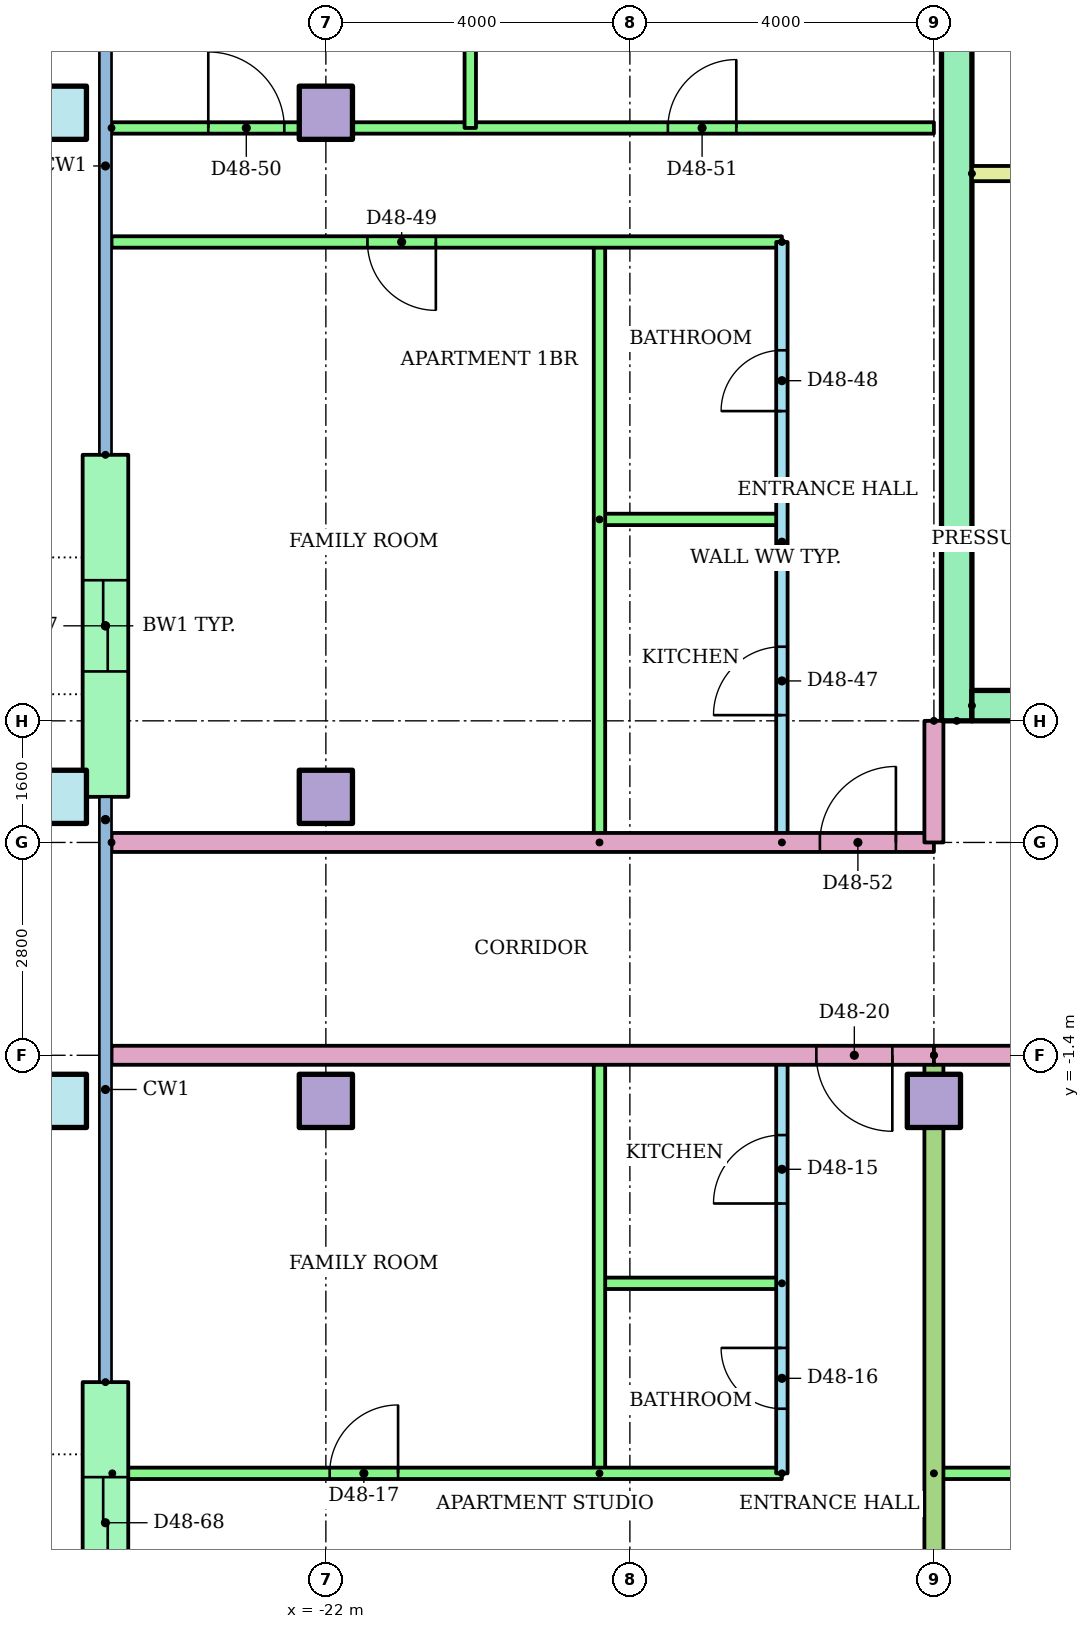
"""IFC4 building model, lengths in metres.
Left out: names, types, materials, properties, quantities, classifications, styles, units other than length and angle.
Written with IfcOpenShell. Run it as: python <this file> out.ifc"""

import sys

from ifc_helpers import new_model, si_unit, direction, frame, frame_2d, origin, origin_2d, place, context, subcontext, project, spatial, rectangle, hollow_rectangle, extrude, element, fill, save


model = new_model("IFC4")
c1 = context("Model", 3, precision=1e-05, world=origin(), true_north=direction((0.0, 1.0)))
c2 = subcontext(c1, "Body", "Model", "MODEL_VIEW")
j1 = project(units=[si_unit("LENGTHUNIT", "METRE"), si_unit("PLANEANGLEUNIT", "RADIAN")], contexts=[c1])
p1 = place(None, origin())
s1 = spatial("IfcSite", under=j1, at=p1, CompositionType="ELEMENT")
p2 = place(p1, origin())
s2 = spatial("IfcBuilding", under=s1, at=p2, CompositionType="ELEMENT")
p3 = place(p2, frame((0.0, 0.0, 184.5)))
s3 = spatial("IfcBuildingStorey", under=s2, at=p3, CompositionType="ELEMENT", Elevation=184.5)
p4 = place(p3, frame((-25.5, -2.0, 0.0)))
e1 = element("IfcColumn", 1, at=p4, inside=s3, PredefinedType="COLUMN", context=c2, shape_type="SweptSolid", body=[
    extrude(hollow_rectangle(XDim=0.7, YDim=0.7, WallThickness=0.036, at=origin_2d()), origin(), (0.0, 0.0, 1.0), 3.2),
])
for number, where in (
    (2, (-22.0, -2.0, 0.0)),
    (3, (-14.0, -2.0, 0.0)),
):
    element("IfcColumn", number, at=place(p3, frame(where)), inside=s3, PredefinedType="COLUMN", context=c2, shape_type="SweptSolid", body=[
        extrude(rectangle(XDim=0.7, YDim=0.7, at=origin_2d()), origin(), (0.0, 0.0, 1.0), 3.2),
    ])
p5 = place(p3, frame((-25.5, 2.0, 0.0)))
e4 = element("IfcColumn", 4, at=p5, inside=s3, PredefinedType="COLUMN", context=c2, shape_type="SweptSolid", body=[
    extrude(hollow_rectangle(XDim=0.7, YDim=0.7, WallThickness=0.036, at=origin_2d()), origin(), (0.0, 0.0, 1.0), 3.2),
])
p6 = place(p3, frame((-22.0, 2.0, 0.0)))
e5 = element("IfcColumn", 5, at=p6, inside=s3, PredefinedType="COLUMN", context=c2, shape_type="SweptSolid", body=[
    extrude(rectangle(XDim=0.7, YDim=0.7, at=origin_2d()), origin(), (0.0, 0.0, 1.0), 3.2),
])
p7 = place(p3, frame((-25.5, 11.0, 0.0)))
e6 = element("IfcColumn", 6, at=p7, inside=s3, PredefinedType="COLUMN", context=c2, shape_type="SweptSolid", body=[
    extrude(hollow_rectangle(XDim=0.7, YDim=0.7, WallThickness=0.036, at=origin_2d()), origin(), (0.0, 0.0, 1.0), 3.2),
])
p8 = place(p3, frame((-22.0, 11.0, 0.0)))
e7 = element("IfcColumn", 7, at=p8, inside=s3, PredefinedType="COLUMN", context=c2, shape_type="SweptSolid", body=[
    extrude(rectangle(XDim=0.7, YDim=0.7, at=origin_2d()), origin(), (0.0, 0.0, 1.0), 3.2),
])
p9 = place(p3, frame((-24.9, 6.5, 0.0), z_axis=(0.0, 0.0, 1.0), x_axis=(0.0, -1.0, 0.0)))
e8 = element("IfcWall", 8, at=p9, inside=s3, PredefinedType="STANDARD", context=c2, shape_type="SweptSolid", body=[
    extrude(rectangle(XDim=4.5, YDim=0.6, at=frame_2d((2.25, 0.0))), origin(), (0.0, 0.0, 1.0), 2.92),
])
p10 = place(p9, frame((1.65, 0.0, 0.0)))
e9 = element("IfcOpeningElement", 9, at=p10, cuts=e8, PredefinedType="OPENING", context=c2, shape_type="SweptSolid", body=[
    extrude(rectangle(XDim=1.2, YDim=2.1, at=frame_2d((0.6, 1.05))), frame((0.0, 0.31, 0.0), z_axis=(0.0, -1.0, 0.0), x_axis=(1.0, 0.0, 0.0)), (0.0, 0.0, 1.0), 0.62),
])
p11 = place(p3, frame((-24.9, -5.7, 0.0), z_axis=(0.0, 0.0, 1.0), x_axis=(0.0, -1.0, 0.0)))
e10 = element("IfcWall", 10, at=p11, inside=s3, PredefinedType="STANDARD", context=c2, shape_type="SweptSolid", body=[
    extrude(rectangle(XDim=3.7, YDim=0.6, at=frame_2d((1.85, 0.0))), origin(), (0.0, 0.0, 1.0), 2.92),
])
p12 = place(p11, frame((1.25, 0.0, 0.0)))
e11 = element("IfcOpeningElement", 11, at=p12, cuts=e10, PredefinedType="OPENING", context=c2, shape_type="SweptSolid", body=[
    extrude(rectangle(XDim=1.2, YDim=2.1, at=frame_2d((0.6, 1.05))), frame((0.0, 0.31, 0.0), z_axis=(0.0, -1.0, 0.0), x_axis=(1.0, 0.0, 0.0)), (0.0, 0.0, 1.0), 0.62),
])
p13 = place(p3, frame((-13.7, 3.0, 0.0), z_axis=(0.0, 0.0, 1.0), x_axis=(0.0, 1.0, 0.0)))
e12 = element("IfcWall", 12, at=p13, inside=s3, PredefinedType="SHEAR", context=c2, shape_type="SweptSolid", body=[
    extrude(rectangle(XDim=17.0, YDim=0.4, at=frame_2d((8.5, 0.0))), origin(), (0.0, 0.0, 1.0), 2.92),
])
p14 = place(p3, frame((-13.5, 3.2, 0.0)))
e13 = element("IfcWall", 13, at=p14, inside=s3, PredefinedType="SHEAR", context=c2, shape_type="SweptSolid", body=[
    extrude(rectangle(XDim=27.0, YDim=0.4, at=frame_2d((13.5, 0.0))), origin(), (0.0, 0.0, 1.0), 2.92),
])
p15 = place(p14, frame((22.083, 0.0, 0.0)))
e14 = element("IfcOpeningElement", 14, at=p15, cuts=e13, PredefinedType="OPENING", context=c2, shape_type="SweptSolid", body=[
    extrude(rectangle(XDim=1.1, YDim=2.1, at=frame_2d((0.55, 1.05))), frame((0.0, 0.21, 0.0), z_axis=(0.0, -1.0, 0.0), x_axis=(1.0, 0.0, 0.0)), (0.0, 0.0, 1.0), 0.42),
])
p16 = place(p14, frame((25.128, 0.0, 0.0)))
e15 = element("IfcOpeningElement", 15, at=p16, cuts=e13, PredefinedType="OPENING", context=c2, shape_type="SweptSolid", body=[
    extrude(rectangle(XDim=1.1, YDim=2.1, at=frame_2d((0.55, 1.05))), frame((0.0, 0.21, 0.0), z_axis=(0.0, -1.0, 0.0), x_axis=(1.0, 0.0, 0.0)), (0.0, 0.0, 1.0), 0.42),
])
p17 = place(p14, frame((12.6, 0.0, 0.0)))
e16 = element("IfcOpeningElement", 16, at=p17, cuts=e13, PredefinedType="OPENING", context=c2, shape_type="SweptSolid", body=[
    extrude(rectangle(XDim=1.8, YDim=2.1, at=frame_2d((0.9, 1.05))), frame((0.0, 0.21, 0.0), z_axis=(0.0, -1.0, 0.0), x_axis=(1.0, 0.0, 0.0)), (0.0, 0.0, 1.0), 0.42),
])
p18 = place(p3, frame((-13.5, 10.2, 0.0)))
e17 = element("IfcWall", 17, at=p18, inside=s3, PredefinedType="PARTITIONING", context=c2, shape_type="SweptSolid", body=[
    extrude(rectangle(XDim=3.9, YDim=0.2, at=frame_2d((1.95, 0.0))), origin(), (0.0, 0.0, 1.0), 2.92),
])
p19 = place(p3, frame((-16.0, -6.9, 0.0), z_axis=(0.0, 0.0, 1.0), x_axis=(0.0, 1.0, 0.0)))
e18 = element("IfcWall", 18, at=p19, inside=s3, PredefinedType="PARTITIONING", context=c2, shape_type="SweptSolid", body=[
    extrude(rectangle(XDim=5.5, YDim=0.15, at=frame_2d((2.75, 0.0))), origin(), (0.0, 0.0, 1.0), 2.4),
])
p20 = place(p19, frame((3.55, 0.0, 0.0)))
e19 = element("IfcOpeningElement", 19, at=p20, cuts=e18, PredefinedType="OPENING", context=c2, shape_type="SweptSolid", body=[
    extrude(rectangle(XDim=0.9, YDim=2.1, at=frame_2d((0.45, 1.05))), frame((0.0, 0.085, 0.0), z_axis=(0.0, -1.0, 0.0), x_axis=(1.0, 0.0, 0.0)), (0.0, 0.0, 1.0), 0.17),
])
p21 = place(p19, frame((0.85, 0.0, 0.0)))
e20 = element("IfcOpeningElement", 20, at=p21, cuts=e18, PredefinedType="OPENING", context=c2, shape_type="SweptSolid", body=[
    extrude(rectangle(XDim=0.8, YDim=2.1, at=frame_2d((0.4, 1.05))), frame((0.0, 0.085, 0.0), z_axis=(0.0, -1.0, 0.0), x_axis=(1.0, 0.0, 0.0)), (0.0, 0.0, 1.0), 0.17),
])
p22 = place(p3, frame((-16.0, -4.4, 0.0), z_axis=(0.0, 0.0, 1.0), x_axis=(-1.0, 0.0, 0.0)))
e21 = element("IfcWall", 21, at=p22, inside=s3, PredefinedType="PARTITIONING", context=c2, shape_type="SweptSolid", body=[
    extrude(rectangle(XDim=2.4, YDim=0.15, at=frame_2d((1.2, 0.0))), origin(), (0.0, 0.0, 1.0), 2.4),
])
p23 = place(p3, frame((-18.4, -6.9, 0.0), z_axis=(0.0, 0.0, 1.0), x_axis=(0.0, 1.0, 0.0)))
e22 = element("IfcWall", 22, at=p23, inside=s3, PredefinedType="PARTITIONING", context=c2, shape_type="SweptSolid", body=[
    extrude(rectangle(XDim=5.5, YDim=0.15, at=frame_2d((2.75, 0.0))), origin(), (0.0, 0.0, 1.0), 2.4),
])
p24 = place(p3, frame((-24.81, -6.9, 0.0)))
e23 = element("IfcWall", 23, at=p24, inside=s3, PredefinedType="PARTITIONING", context=c2, shape_type="SweptSolid", body=[
    extrude(rectangle(XDim=8.81, YDim=0.15, at=frame_2d((4.405, 0.0))), origin(), (0.0, 0.0, 1.0), 2.4),
])
p25 = place(p24, frame((2.86, 0.0, 0.0)))
e24 = element("IfcOpeningElement", 24, at=p25, cuts=e23, PredefinedType="OPENING", context=c2, shape_type="SweptSolid", body=[
    extrude(rectangle(XDim=0.9, YDim=2.1, at=frame_2d((0.45, 1.05))), frame((0.0, 0.085, 0.0), z_axis=(0.0, -1.0, 0.0), x_axis=(1.0, 0.0, 0.0)), (0.0, 0.0, 1.0), 0.17),
])
p26 = place(p3, frame((-14.0, -6.9, 0.0)))
e25 = element("IfcWall", 25, at=p26, inside=s3, PredefinedType="PARTITIONING", context=c2, shape_type="SweptSolid", body=[
    extrude(rectangle(XDim=22.0, YDim=0.15, at=frame_2d((11.0, 0.0))), origin(), (0.0, 0.0, 1.0), 2.4),
])
p27 = place(p26, frame((16.65, 0.0, 0.0)))
e26 = element("IfcOpeningElement", 26, at=p27, cuts=e25, PredefinedType="OPENING", context=c2, shape_type="SweptSolid", body=[
    extrude(rectangle(XDim=0.9, YDim=2.1, at=frame_2d((0.45, 1.05))), frame((0.0, 0.085, 0.0), z_axis=(0.0, -1.0, 0.0), x_axis=(1.0, 0.0, 0.0)), (0.0, 0.0, 1.0), 0.17),
])
p28 = place(p26, frame((10.9, 0.0, 0.0)))
e27 = element("IfcOpeningElement", 27, at=p28, cuts=e25, PredefinedType="OPENING", context=c2, shape_type="SweptSolid", body=[
    extrude(rectangle(XDim=0.9, YDim=2.1, at=frame_2d((0.45, 1.05))), frame((0.0, 0.085, 0.0), z_axis=(0.0, -1.0, 0.0), x_axis=(1.0, 0.0, 0.0)), (0.0, 0.0, 1.0), 0.17),
])
p29 = place(p26, frame((3.6, 0.0, 0.0)))
e28 = element("IfcOpeningElement", 28, at=p29, cuts=e25, PredefinedType="OPENING", context=c2, shape_type="SweptSolid", body=[
    extrude(rectangle(XDim=0.9, YDim=2.1, at=frame_2d((0.45, 1.05))), frame((0.0, 0.085, 0.0), z_axis=(0.0, -1.0, 0.0), x_axis=(1.0, 0.0, 0.0)), (0.0, 0.0, 1.0), 0.17),
])
p30 = place(p3, frame((-14.0, -1.4, 0.0), z_axis=(0.0, 0.0, 1.0), x_axis=(0.0, -1.0, 0.0)))
e29 = element("IfcWall", 29, at=p30, inside=s3, PredefinedType="PARTITIONING", context=c2, shape_type="SweptSolid", body=[
    extrude(rectangle(XDim=15.01, YDim=0.25, at=frame_2d((7.505, 0.0))), origin(), (0.0, 0.0, 1.0), 2.4),
])
p31 = place(p3, frame((-14.0, -1.4, 0.0), z_axis=(0.0, 0.0, 1.0), x_axis=(-1.0, 0.0, 0.0)))
e30 = element("IfcWall", 30, at=p31, inside=s3, PredefinedType="PARTITIONING", context=c2, shape_type="SweptSolid", body=[
    extrude(rectangle(XDim=10.82, YDim=0.25, at=frame_2d((5.41, 0.0))), origin(), (0.0, 0.0, 1.0), 2.4),
])
p32 = place(p31, frame((0.547, 0.0, 0.0)))
e31 = element("IfcOpeningElement", 31, at=p32, cuts=e30, PredefinedType="OPENING", context=c2, shape_type="SweptSolid", body=[
    extrude(rectangle(XDim=1.0, YDim=2.1, at=frame_2d((0.5, 1.05))), frame((0.0, 0.135, 0.0), z_axis=(0.0, -1.0, 0.0), x_axis=(1.0, 0.0, 0.0)), (0.0, 0.0, 1.0), 0.27),
])
p33 = place(p3, frame((-16.0, 1.4, 0.0), z_axis=(0.0, 0.0, 1.0), x_axis=(0.0, 1.0, 0.0)))
e32 = element("IfcWall", 32, at=p33, inside=s3, PredefinedType="PARTITIONING", context=c2, shape_type="SweptSolid", body=[
    extrude(rectangle(XDim=7.9, YDim=0.15, at=frame_2d((3.95, 0.0))), origin(), (0.0, 0.0, 1.0), 2.4),
])
p34 = place(p33, frame((1.675, 0.0, 0.0)))
e33 = element("IfcOpeningElement", 33, at=p34, cuts=e32, PredefinedType="OPENING", context=c2, shape_type="SweptSolid", body=[
    extrude(rectangle(XDim=0.9, YDim=2.1, at=frame_2d((0.45, 1.05))), frame((0.0, 0.085, 0.0), z_axis=(0.0, -1.0, 0.0), x_axis=(1.0, 0.0, 0.0)), (0.0, 0.0, 1.0), 0.17),
])
p35 = place(p33, frame((5.675, 0.0, 0.0)))
e34 = element("IfcOpeningElement", 34, at=p35, cuts=e32, PredefinedType="OPENING", context=c2, shape_type="SweptSolid", body=[
    extrude(rectangle(XDim=0.8, YDim=2.1, at=frame_2d((0.4, 1.05))), frame((0.0, 0.085, 0.0), z_axis=(0.0, -1.0, 0.0), x_axis=(1.0, 0.0, 0.0)), (0.0, 0.0, 1.0), 0.17),
])
p36 = place(p3, frame((-18.4, 5.65, 0.0)))
e35 = element("IfcWall", 35, at=p36, inside=s3, PredefinedType="PARTITIONING", context=c2, shape_type="SweptSolid", body=[
    extrude(rectangle(XDim=2.4, YDim=0.15, at=frame_2d((1.2, 0.0))), origin(), (0.0, 0.0, 1.0), 2.4),
])
p37 = place(p3, frame((-18.4, 1.4, 0.0), z_axis=(0.0, 0.0, 1.0), x_axis=(0.0, 1.0, 0.0)))
e36 = element("IfcWall", 36, at=p37, inside=s3, PredefinedType="PARTITIONING", context=c2, shape_type="SweptSolid", body=[
    extrude(rectangle(XDim=7.9, YDim=0.15, at=frame_2d((3.95, 0.0))), origin(), (0.0, 0.0, 1.0), 2.4),
])
p38 = place(p3, frame((-16.0, 9.3, 0.0), z_axis=(0.0, 0.0, 1.0), x_axis=(-1.0, 0.0, 0.0)))
e37 = element("IfcWall", 37, at=p38, inside=s3, PredefinedType="PARTITIONING", context=c2, shape_type="SweptSolid", body=[
    extrude(rectangle(XDim=8.82, YDim=0.15, at=frame_2d((4.41, 0.0))), origin(), (0.0, 0.0, 1.0), 2.4),
])
p39 = place(p38, frame((4.553, 0.0, 0.0)))
e38 = element("IfcOpeningElement", 38, at=p39, cuts=e37, PredefinedType="OPENING", context=c2, shape_type="SweptSolid", body=[
    extrude(rectangle(XDim=0.9, YDim=2.1, at=frame_2d((0.45, 1.05))), frame((0.0, 0.085, 0.0), z_axis=(0.0, -1.0, 0.0), x_axis=(1.0, 0.0, 0.0)), (0.0, 0.0, 1.0), 0.17),
])
p40 = place(p3, frame((-24.82, 10.8, 0.0)))
e39 = element("IfcWall", 39, at=p40, inside=s3, PredefinedType="PARTITIONING", context=c2, shape_type="SweptSolid", body=[
    extrude(rectangle(XDim=10.82, YDim=0.15, at=frame_2d((5.41, 0.0))), origin(), (0.0, 0.0, 1.0), 2.4),
])
p41 = place(p40, frame((1.273, 0.0, 0.0)))
e40 = element("IfcOpeningElement", 40, at=p41, cuts=e39, PredefinedType="OPENING", context=c2, shape_type="SweptSolid", body=[
    extrude(rectangle(XDim=1.0, YDim=2.1, at=frame_2d((0.5, 1.05))), frame((0.0, 0.085, 0.0), z_axis=(0.0, -1.0, 0.0), x_axis=(1.0, 0.0, 0.0)), (0.0, 0.0, 1.0), 0.17),
])
p42 = place(p40, frame((7.32, 0.0, 0.0)))
e41 = element("IfcOpeningElement", 41, at=p42, cuts=e39, PredefinedType="OPENING", context=c2, shape_type="SweptSolid", body=[
    extrude(rectangle(XDim=0.9, YDim=2.1, at=frame_2d((0.45, 1.05))), frame((0.0, 0.085, 0.0), z_axis=(0.0, -1.0, 0.0), x_axis=(1.0, 0.0, 0.0)), (0.0, 0.0, 1.0), 0.17),
])
p43 = place(p3, frame((-20.1, 17.02, 0.0), z_axis=(0.0, 0.0, 1.0), x_axis=(0.0, -1.0, 0.0)))
e42 = element("IfcWall", 42, at=p43, inside=s3, PredefinedType="PARTITIONING", context=c2, shape_type="SweptSolid", body=[
    extrude(rectangle(XDim=6.22, YDim=0.15, at=frame_2d((3.11, 0.0))), origin(), (0.0, 0.0, 1.0), 2.4),
])
p44 = place(p3, frame((-24.82, 1.4, 0.0)))
e43 = element("IfcWall", 43, at=p44, inside=s3, PredefinedType="PARTITIONING", context=c2, shape_type="SweptSolid", body=[
    extrude(rectangle(XDim=10.82, YDim=0.25, at=frame_2d((5.41, 0.0))), origin(), (0.0, 0.0, 1.0), 2.4),
])
p45 = place(p44, frame((9.32, 0.0, 0.0)))
e44 = element("IfcOpeningElement", 44, at=p45, cuts=e43, PredefinedType="OPENING", context=c2, shape_type="SweptSolid", body=[
    extrude(rectangle(XDim=1.0, YDim=2.1, at=frame_2d((0.5, 1.05))), frame((0.0, 0.135, 0.0), z_axis=(0.0, -1.0, 0.0), x_axis=(1.0, 0.0, 0.0)), (0.0, 0.0, 1.0), 0.27),
])
p46 = place(p3, frame((14.0, -1.4, 0.0), z_axis=(0.0, 0.0, 1.0), x_axis=(-1.0, 0.0, 0.0)))
e45 = element("IfcWall", 45, at=p46, inside=s3, PredefinedType="PARTITIONING", context=c2, shape_type="SweptSolid", body=[
    extrude(rectangle(XDim=28.0, YDim=0.25, at=frame_2d((14.0, 0.0))), origin(), (0.0, 0.0, 1.0), 2.4),
])
p47 = place(p46, frame((4.547, 0.0, 0.0)))
e46 = element("IfcOpeningElement", 46, at=p47, cuts=e45, PredefinedType="OPENING", context=c2, shape_type="SweptSolid", body=[
    extrude(rectangle(XDim=1.0, YDim=2.1, at=frame_2d((0.5, 1.05))), frame((0.0, 0.135, 0.0), z_axis=(0.0, -1.0, 0.0), x_axis=(1.0, 0.0, 0.0)), (0.0, 0.0, 1.0), 0.27),
])
p48 = place(p46, frame((2.453, 0.0, 0.0)))
e47 = element("IfcOpeningElement", 47, at=p48, cuts=e45, PredefinedType="OPENING", context=c2, shape_type="SweptSolid", body=[
    extrude(rectangle(XDim=1.0, YDim=2.1, at=frame_2d((0.5, 1.05))), frame((0.0, 0.135, 0.0), z_axis=(0.0, -1.0, 0.0), x_axis=(1.0, 0.0, 0.0)), (0.0, 0.0, 1.0), 0.27),
])
p49 = place(p3, frame((-14.0, 3.0, 0.0), z_axis=(0.0, 0.0, 1.0), x_axis=(0.0, -1.0, 0.0)))
e48 = element("IfcWall", 48, at=p49, inside=s3, PredefinedType="PARTITIONING", context=c2, shape_type="SweptSolid", body=[
    extrude(rectangle(XDim=1.6, YDim=0.25, at=frame_2d((0.8, 0.0))), origin(), (0.0, 0.0, 1.0), 2.4),
])
p50 = place(p20, origin())
e49 = element("IfcDoor", 49, at=p50, inside=s3, OperationType="SINGLE_SWING_LEFT", PredefinedType="DOOR", context=c2, shape_type="SweptSolid", body=[
    extrude(rectangle(XDim=0.9, YDim=2.1, at=frame_2d((0.45, 1.05))), frame((0.0, 0.025, 0.0), z_axis=(0.0, -1.0, 0.0), x_axis=(1.0, 0.0, 0.0)), (0.0, 0.0, 1.0), 0.05),
])
fill(e19, e49)
p51 = place(p21, origin())
e50 = element("IfcDoor", 50, at=p51, inside=s3, OperationType="SINGLE_SWING_RIGHT", PredefinedType="DOOR", context=c2, shape_type="SweptSolid", body=[
    extrude(rectangle(XDim=0.8, YDim=2.1, at=frame_2d((0.4, 1.05))), frame((0.0, 0.025, 0.0), z_axis=(0.0, -1.0, 0.0), x_axis=(1.0, 0.0, 0.0)), (0.0, 0.0, 1.0), 0.05),
])
fill(e20, e50)
p52 = place(p25, origin())
e51 = element("IfcDoor", 51, at=p52, inside=s3, OperationType="SINGLE_SWING_RIGHT", PredefinedType="DOOR", context=c2, shape_type="SweptSolid", body=[
    extrude(rectangle(XDim=0.9, YDim=2.1, at=frame_2d((0.45, 1.05))), frame((0.0, 0.025, 0.0), z_axis=(0.0, -1.0, 0.0), x_axis=(1.0, 0.0, 0.0)), (0.0, 0.0, 1.0), 0.05),
])
fill(e24, e51)
p53 = place(p32, origin())
e52 = element("IfcDoor", 52, at=p53, inside=s3, OperationType="SINGLE_SWING_LEFT", PredefinedType="DOOR", context=c2, shape_type="SweptSolid", body=[
    extrude(rectangle(XDim=1.0, YDim=2.1, at=frame_2d((0.5, 1.05))), frame((0.0, 0.025, 0.0), z_axis=(0.0, -1.0, 0.0), x_axis=(1.0, 0.0, 0.0)), (0.0, 0.0, 1.0), 0.05),
])
fill(e31, e52)
p54 = place(p34, origin())
e53 = element("IfcDoor", 53, at=p54, inside=s3, OperationType="SINGLE_SWING_LEFT", PredefinedType="DOOR", context=c2, shape_type="SweptSolid", body=[
    extrude(rectangle(XDim=0.9, YDim=2.1, at=frame_2d((0.45, 1.05))), frame((0.0, 0.025, 0.0), z_axis=(0.0, -1.0, 0.0), x_axis=(1.0, 0.0, 0.0)), (0.0, 0.0, 1.0), 0.05),
])
fill(e33, e53)
p55 = place(p35, origin())
e54 = element("IfcDoor", 54, at=p55, inside=s3, OperationType="SINGLE_SWING_LEFT", PredefinedType="DOOR", context=c2, shape_type="SweptSolid", body=[
    extrude(rectangle(XDim=0.8, YDim=2.1, at=frame_2d((0.4, 1.05))), frame((0.0, 0.025, 0.0), z_axis=(0.0, -1.0, 0.0), x_axis=(1.0, 0.0, 0.0)), (0.0, 0.0, 1.0), 0.05),
])
fill(e34, e54)
p56 = place(p39, origin())
e55 = element("IfcDoor", 55, at=p56, inside=s3, OperationType="SINGLE_SWING_LEFT", PredefinedType="DOOR", context=c2, shape_type="SweptSolid", body=[
    extrude(rectangle(XDim=0.9, YDim=2.1, at=frame_2d((0.45, 1.05))), frame((0.0, 0.025, 0.0), z_axis=(0.0, -1.0, 0.0), x_axis=(1.0, 0.0, 0.0)), (0.0, 0.0, 1.0), 0.05),
])
fill(e38, e55)
p57 = place(p41, origin())
e56 = element("IfcDoor", 56, at=p57, inside=s3, OperationType="SINGLE_SWING_LEFT", PredefinedType="DOOR", context=c2, shape_type="SweptSolid", body=[
    extrude(rectangle(XDim=1.0, YDim=2.1, at=frame_2d((0.5, 1.05))), frame((0.0, 0.025, 0.0), z_axis=(0.0, -1.0, 0.0), x_axis=(1.0, 0.0, 0.0)), (0.0, 0.0, 1.0), 0.05),
])
fill(e40, e56)
p58 = place(p42, origin())
e57 = element("IfcDoor", 57, at=p58, inside=s3, OperationType="SINGLE_SWING_RIGHT", PredefinedType="DOOR", context=c2, shape_type="SweptSolid", body=[
    extrude(rectangle(XDim=0.9, YDim=2.1, at=frame_2d((0.45, 1.05))), frame((0.0, 0.025, 0.0), z_axis=(0.0, -1.0, 0.0), x_axis=(1.0, 0.0, 0.0)), (0.0, 0.0, 1.0), 0.05),
])
fill(e41, e57)
p59 = place(p45, origin())
e58 = element("IfcDoor", 58, at=p59, inside=s3, OperationType="SINGLE_SWING_RIGHT", PredefinedType="DOOR", context=c2, shape_type="SweptSolid", body=[
    extrude(rectangle(XDim=1.0, YDim=2.1, at=frame_2d((0.5, 1.05))), frame((0.0, 0.025, 0.0), z_axis=(0.0, -1.0, 0.0), x_axis=(1.0, 0.0, 0.0)), (0.0, 0.0, 1.0), 0.05),
])
fill(e44, e58)
p60 = place(p10, origin())
e59 = element("IfcDoor", 59, at=p60, inside=s3, OperationType="SLIDING_TO_LEFT", PredefinedType="DOOR", context=c2, shape_type="SweptSolid", body=[
    extrude(rectangle(XDim=1.2, YDim=2.1, at=frame_2d((0.6, 1.05))), frame((0.0, 0.025, 0.0), z_axis=(0.0, -1.0, 0.0), x_axis=(1.0, 0.0, 0.0)), (0.0, 0.0, 1.0), 0.05),
])
fill(e9, e59)
p61 = place(p12, origin())
e60 = element("IfcDoor", 60, at=p61, inside=s3, OperationType="SLIDING_TO_LEFT", PredefinedType="DOOR", context=c2, shape_type="SweptSolid", body=[
    extrude(rectangle(XDim=1.2, YDim=2.1, at=frame_2d((0.6, 1.05))), frame((0.0, 0.025, 0.0), z_axis=(0.0, -1.0, 0.0), x_axis=(1.0, 0.0, 0.0)), (0.0, 0.0, 1.0), 0.05),
])
fill(e11, e60)
save(model, sys.argv[1])
